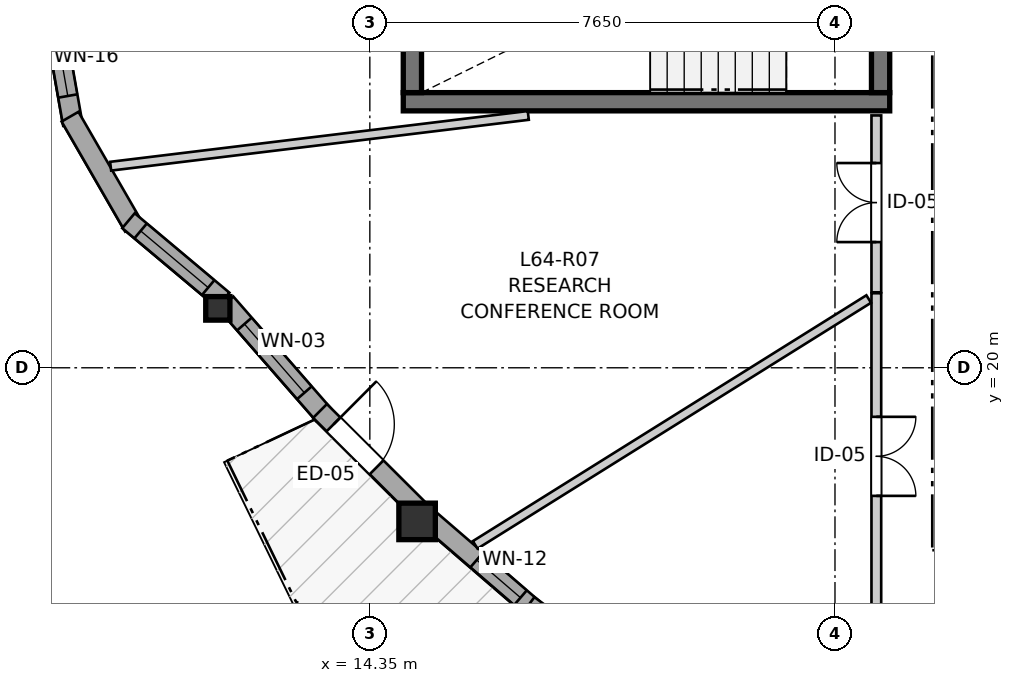
"""IFC4 building model, lengths in metres.
Left out: names, types, materials, properties, quantities, classifications, styles, units other than length and angle.
Written with IfcOpenShell. Run it as: python <this file> out.ifc"""

import sys

from ifc_helpers import new_model, si_unit, direction, frame, frame_2d, origin, origin_2d, place, context, subcontext, project, spatial, rectangle, i_section, extrude, source, transform, mapped, element, fill, save


model = new_model("IFC4")
c1 = context("Model", 3, precision=1e-05, world=origin(), true_north=direction((0.0, 1.0)))
c2 = subcontext(c1, "Body", "Model", "MODEL_VIEW")
j1 = project(units=[si_unit("LENGTHUNIT", "METRE"), si_unit("PLANEANGLEUNIT", "RADIAN")], contexts=[c1])
p1 = place(None, origin())
s1 = spatial("IfcSite", under=j1, at=p1, CompositionType="ELEMENT")
p2 = place(p1, origin())
s2 = spatial("IfcBuilding", under=s1, at=p2, CompositionType="ELEMENT")
p3 = place(p2, frame((0.0, 0.0, 214.8)))
s3 = spatial("IfcBuildingStorey", under=s2, at=p3, CompositionType="ELEMENT", Elevation=214.8)
p4 = place(p3, frame((14.9, 24.375, 0.0), z_axis=(0.0, 0.0, 1.0), x_axis=(1.0, 0.0, 0.0)))
e1 = element("IfcWall", 1, at=p4, inside=s3, PredefinedType="SHEAR", context=c2, shape_type="SweptSolid", body=[
    extrude(rectangle(XDim=8.0, YDim=0.3, at=frame_2d((4.0, 0.0))), origin(), (0.0, 0.0, 1.0), 2.96),
])
p5 = place(p3, frame((15.05, 27.475, 0.0), z_axis=(0.0, 0.0, 1.0), x_axis=(0.0, -1.0, 0.0)))
e2 = element("IfcWall", 2, at=p5, inside=s3, PredefinedType="SHEAR", context=c2, shape_type="SweptSolid", body=[
    extrude(rectangle(XDim=2.95, YDim=0.3, at=frame_2d((1.475, 0.0))), origin(), (0.0, 0.0, 1.0), 2.96),
])
p6 = place(p3, frame((22.75, 24.525, 0.0), z_axis=(0.0, 0.0, 1.0), x_axis=(0.0, 1.0, 0.0)))
e3 = element("IfcWall", 3, at=p6, inside=s3, PredefinedType="SHEAR", context=c2, shape_type="SweptSolid", body=[
    extrude(rectangle(XDim=2.95, YDim=0.3, at=frame_2d((1.475, 0.0))), origin(), (0.0, 0.0, 1.0), 2.96),
])
p7 = place(p6, frame((0.985, 0.0, 0.0)))
e4 = element("IfcOpeningElement", 4, at=p7, cuts=e3, PredefinedType="OPENING", context=c2, shape_type="SweptSolid", body=[
    extrude(rectangle(XDim=0.98, YDim=2.15, at=frame_2d((0.49, 1.075))), frame((0.0, 0.16, 0.0), z_axis=(0.0, -1.0, 0.0), x_axis=(1.0, 0.0, 0.0)), (0.0, 0.0, 1.0), 0.32),
])
m1 = source(origin(), c2, "Body", "SweptSolid", [
    extrude(i_section(OverallWidth=0.398, OverallDepth=0.387, WebThickness=0.019, FlangeThickness=0.03, FilletRadius=0.015, at=origin_2d()), origin(), (0.0, 0.0, 1.0), 2.96),
])
p8 = place(p3, frame((11.85, 20.977, 0.0), z_axis=(0.0, 0.0, 1.0), x_axis=(1.0, 0.0, 0.0)))
e5 = element("IfcColumn", 5, at=p8, inside=s3, PredefinedType="PILASTER", context=c2, shape_type="MappedRepresentation", body=[
    mapped(m1, transform((0.0, 0.0, 0.0), x_axis=(1.0, 0.0, 0.0), y_axis=(0.0, 1.0, 0.0), z_axis=(0.0, 0.0, 1.0), scale=1.0)),
])
m2 = source(origin(), c2, "Body", "SweptSolid", [
    extrude(rectangle(XDim=0.6, YDim=0.6, at=origin_2d()), origin(), (0.0, 0.0, 1.0), 2.96),
])
p9 = place(p3, frame((15.127, 17.474, 0.0), z_axis=(0.0, 0.0, 1.0), x_axis=(1.0, 0.0, 0.0)))
e6 = element("IfcColumn", 6, at=p9, inside=s3, PredefinedType="COLUMN", context=c2, shape_type="MappedRepresentation", body=[
    mapped(m2, transform((0.0, 0.0, 0.0), x_axis=(1.0, 0.0, 0.0), y_axis=(0.0, 1.0, 0.0), z_axis=(0.0, 0.0, 1.0), scale=1.0)),
])
p10 = place(p3, frame((9.101, 26.065, 0.0), z_axis=(0.0, 0.0, 1.0), x_axis=(0.173672066494, -0.984803540469, 0.0)))
e7 = element("IfcWall", 7, at=p10, inside=s3, PredefinedType="SOLIDWALL", context=c2, shape_type="SweptSolid", body=[
    extrude(rectangle(XDim=2.09, YDim=0.32, at=frame_2d((1.045, 0.0))), origin(), (0.0, 0.0, 1.0), 2.58),
])
p11 = place(p10, frame((0.47, 0.0, 0.82)))
e8 = element("IfcOpeningElement", 8, at=p11, cuts=e7, PredefinedType="OPENING", context=c2, shape_type="SweptSolid", body=[
    extrude(rectangle(XDim=1.15, YDim=1.2, at=frame_2d((0.575, 0.6))), frame((0.0, 0.17, 0.0), z_axis=(0.0, -1.0, 0.0), x_axis=(1.0, 0.0, 0.0)), (0.0, 0.0, 1.0), 0.34),
])
p12 = place(p3, frame((9.419, 24.129, 0.0), z_axis=(0.0, 0.0, 1.0), x_axis=(0.499995423472, -0.866028046028, 0.0)))
e9 = element("IfcWall", 9, at=p12, inside=s3, PredefinedType="SOLIDWALL", context=c2, shape_type="SweptSolid", body=[
    extrude(rectangle(XDim=2.09, YDim=0.32, at=frame_2d((1.045, 0.0))), origin(), (0.0, 0.0, 1.0), 2.58),
])
p13 = place(p3, frame((10.381, 22.419, 0.0), z_axis=(0.0, 0.0, 1.0), x_axis=(0.766099948115, -0.642721455608, 0.0)))
e10 = element("IfcWall", 10, at=p13, inside=s3, PredefinedType="SOLIDWALL", context=c2, shape_type="SweptSolid", body=[
    extrude(rectangle(XDim=2.032, YDim=0.32, at=frame_2d((1.016, 0.0))), origin(), (0.0, 0.0, 1.0), 2.58),
])
p14 = place(p13, frame((0.261, 0.0, 0.82)))
e11 = element("IfcOpeningElement", 11, at=p14, cuts=e10, PredefinedType="OPENING", context=c2, shape_type="SweptSolid", body=[
    extrude(rectangle(XDim=1.45, YDim=1.25, at=frame_2d((0.725, 0.625))), frame((0.0, 0.17, 0.0), z_axis=(0.0, -1.0, 0.0), x_axis=(1.0, 0.0, 0.0)), (0.0, 0.0, 1.0), 0.34),
])
p15 = place(p3, frame((11.984, 21.067, 0.0), z_axis=(0.0, 0.0, 1.0), x_axis=(0.657577552216, -0.753386861328, 0.0)))
e12 = element("IfcWall", 12, at=p15, inside=s3, PredefinedType="SOLIDWALL", context=c2, shape_type="SweptSolid", body=[
    extrude(rectangle(XDim=2.444, YDim=0.32, at=frame_2d((1.222, 0.0))), origin(), (0.0, 0.0, 1.0), 2.58),
])
p16 = place(p15, frame((0.462, 0.0, 0.82)))
e13 = element("IfcOpeningElement", 13, at=p16, cuts=e12, PredefinedType="OPENING", context=c2, shape_type="SweptSolid", body=[
    extrude(rectangle(XDim=1.5, YDim=1.45, at=frame_2d((0.75, 0.725))), frame((0.0, 0.17, 0.0), z_axis=(0.0, -1.0, 0.0), x_axis=(1.0, 0.0, 0.0)), (0.0, 0.0, 1.0), 0.34),
])
p17 = place(p3, frame((13.531, 19.29, 0.0), z_axis=(0.0, 0.0, 1.0), x_axis=(0.708419394795, -0.705791726417, 0.0)))
e14 = element("IfcWall", 14, at=p17, inside=s3, PredefinedType="SOLIDWALL", context=c2, shape_type="SweptSolid", body=[
    extrude(rectangle(XDim=2.323, YDim=0.32, at=frame_2d((1.161, 0.0))), origin(), (0.0, 0.0, 1.0), 2.58),
])
p18 = place(p17, frame((0.313, 0.0, 0.0)))
e15 = element("IfcOpeningElement", 15, at=p18, cuts=e14, PredefinedType="OPENING", context=c2, shape_type="SweptSolid", body=[
    extrude(rectangle(XDim=1.0, YDim=2.1, at=frame_2d((0.5, 1.05))), frame((0.0, 0.17, 0.0), z_axis=(0.0, -1.0, 0.0), x_axis=(1.0, 0.0, 0.0)), (0.0, 0.0, 1.0), 0.34),
])
p19 = place(p3, frame((15.3, 17.536, 0.0), z_axis=(0.0, 0.0, 1.0), x_axis=(0.757488333031, -0.652848700177, 0.0)))
e16 = element("IfcWall", 16, at=p19, inside=s3, PredefinedType="SOLIDWALL", context=c2, shape_type="SweptSolid", body=[
    extrude(rectangle(XDim=2.284, YDim=0.32, at=frame_2d((1.142, 0.0))), origin(), (0.0, 0.0, 1.0), 2.58),
])
p20 = place(p19, frame((1.067, 0.0, 0.82)))
e17 = element("IfcOpeningElement", 17, at=p20, cuts=e16, PredefinedType="OPENING", context=c2, shape_type="SweptSolid", body=[
    extrude(rectangle(XDim=0.95, YDim=1.35, at=frame_2d((0.475, 0.675))), frame((0.0, 0.17, 0.0), z_axis=(0.0, -1.0, 0.0), x_axis=(1.0, 0.0, 0.0)), (0.0, 0.0, 1.0), 0.34),
])
p21 = place(p3, frame((16.961, 16.1, 0.0), z_axis=(0.0, 0.0, 1.0), x_axis=(0.803809802043, -0.594886377504, 0.0)))
e18 = element("IfcWall", 18, at=p21, inside=s3, PredefinedType="SOLIDWALL", context=c2, shape_type="SweptSolid", body=[
    extrude(rectangle(XDim=2.328, YDim=0.32, at=frame_2d((1.164, 0.0))), origin(), (0.0, 0.0, 1.0), 2.58),
])
p22 = place(p21, frame((0.649, 0.0, 0.82)))
e19 = element("IfcOpeningElement", 19, at=p22, cuts=e18, PredefinedType="OPENING", context=c2, shape_type="SweptSolid", body=[
    extrude(rectangle(XDim=1.05, YDim=1.45, at=frame_2d((0.525, 0.725))), frame((0.0, 0.17, 0.0), z_axis=(0.0, -1.0, 0.0), x_axis=(1.0, 0.0, 0.0)), (0.0, 0.0, 1.0), 0.34),
])
p23 = place(p3, frame((22.68, 21.226, 0.0), z_axis=(0.0, 0.0, 1.0), x_axis=(0.0, -1.0, 0.0)))
e20 = element("IfcWall", 20, at=p23, inside=s3, PredefinedType="PARTITIONING", context=c2, shape_type="SweptSolid", body=[
    extrude(rectangle(XDim=5.348, YDim=0.16, at=frame_2d((2.674, 0.0))), origin(), (0.0, 0.0, 1.0), 2.96),
])
p24 = place(p23, frame((2.032, 0.0, 0.0)))
e21 = element("IfcOpeningElement", 21, at=p24, cuts=e20, PredefinedType="OPENING", context=c2, shape_type="SweptSolid", body=[
    extrude(rectangle(XDim=1.3, YDim=2.1, at=frame_2d((0.65, 1.05))), frame((0.0, 0.09, 0.0), z_axis=(0.0, -1.0, 0.0), x_axis=(1.0, 0.0, 0.0)), (0.0, 0.0, 1.0), 0.18),
])
p25 = place(p3, frame((22.68, 21.241, 0.0), z_axis=(0.0, 0.0, 1.0), x_axis=(0.0, 1.0, 0.0)))
e22 = element("IfcWall", 22, at=p25, inside=s3, PredefinedType="PARTITIONING", context=c2, shape_type="SweptSolid", body=[
    extrude(rectangle(XDim=2.909, YDim=0.16, at=frame_2d((1.455, 0.0))), origin(), (0.0, 0.0, 1.0), 2.96),
])
p26 = place(p25, frame((0.826, 0.0, 0.0)))
e23 = element("IfcOpeningElement", 23, at=p26, cuts=e22, PredefinedType="OPENING", context=c2, shape_type="SweptSolid", body=[
    extrude(rectangle(XDim=1.3, YDim=2.1, at=frame_2d((0.65, 1.05))), frame((0.0, 0.09, 0.0), z_axis=(0.0, -1.0, 0.0), x_axis=(1.0, 0.0, 0.0)), (0.0, 0.0, 1.0), 0.18),
])
p27 = place(p3, frame((16.083, 17.088, 0.0), z_axis=(0.0, 0.0, 1.0), x_axis=(0.848100737451, 0.529835011239, 0.0)))
e24 = element("IfcWall", 24, at=p27, inside=s3, PredefinedType="PARTITIONING", context=c2, shape_type="SweptSolid", body=[
    extrude(rectangle(XDim=7.631, YDim=0.145, at=frame_2d((3.815, 0.0))), origin(), (0.0, 0.0, 1.0), 2.96),
])
p28 = place(p3, frame((10.087, 23.315, 0.0), z_axis=(0.0, 0.0, 1.0), x_axis=(0.992692853732, 0.120668546642, 0.0)))
e25 = element("IfcWall", 25, at=p28, inside=s3, PredefinedType="PARTITIONING", context=c2, shape_type="SweptSolid", body=[
    extrude(rectangle(XDim=6.919, YDim=0.145, at=frame_2d((3.46, 0.0))), origin(), (0.0, 0.0, 1.0), 2.96),
])
m3 = source(origin(), c2, "Body", "SweptSolid", [
    extrude(rectangle(XDim=1.15, YDim=1.2, at=frame_2d((0.575, 0.6))), frame((0.0, 0.03, 0.0), z_axis=(0.0, -1.0, 0.0), x_axis=(1.0, 0.0, 0.0)), (0.0, 0.0, 1.0), 0.06),
])
p29 = place(p11, origin())
e26 = element("IfcWindow", 26, at=p29, inside=s3, PartitioningType="SINGLE_PANEL", PredefinedType="WINDOW", context=c2, shape_type="MappedRepresentation", body=[
    mapped(m3, transform((0.0, 0.0, 0.0), x_axis=(1.0, 0.0, 0.0), y_axis=(0.0, 1.0, 0.0), z_axis=(0.0, 0.0, 1.0), scale=1.0)),
])
fill(e8, e26)
m4 = source(origin(), c2, "Body", "SweptSolid", [
    extrude(rectangle(XDim=1.45, YDim=1.25, at=frame_2d((0.725, 0.625))), frame((0.0, 0.03, 0.0), z_axis=(0.0, -1.0, 0.0), x_axis=(1.0, 0.0, 0.0)), (0.0, 0.0, 1.0), 0.06),
])
p30 = place(p14, origin())
e27 = element("IfcWindow", 27, at=p30, inside=s3, PartitioningType="SINGLE_PANEL", PredefinedType="WINDOW", context=c2, shape_type="MappedRepresentation", body=[
    mapped(m4, transform((0.0, 0.0, 0.0), x_axis=(1.0, 0.0, 0.0), y_axis=(0.0, 1.0, 0.0), z_axis=(0.0, 0.0, 1.0), scale=1.0)),
])
fill(e11, e27)
m5 = source(origin(), c2, "Body", "SweptSolid", [
    extrude(rectangle(XDim=1.5, YDim=1.45, at=frame_2d((0.75, 0.725))), frame((0.0, 0.03, 0.0), z_axis=(0.0, -1.0, 0.0), x_axis=(1.0, 0.0, 0.0)), (0.0, 0.0, 1.0), 0.06),
])
p31 = place(p16, origin())
e28 = element("IfcWindow", 28, at=p31, inside=s3, PartitioningType="SINGLE_PANEL", PredefinedType="WINDOW", context=c2, shape_type="MappedRepresentation", body=[
    mapped(m5, transform((0.0, 0.0, 0.0), x_axis=(1.0, 0.0, 0.0), y_axis=(0.0, 1.0, 0.0), z_axis=(0.0, 0.0, 1.0), scale=1.0)),
])
fill(e13, e28)
m6 = source(origin(), c2, "Body", "SweptSolid", [
    extrude(rectangle(XDim=0.95, YDim=1.35, at=frame_2d((0.475, 0.675))), frame((0.0, 0.03, 0.0), z_axis=(0.0, -1.0, 0.0), x_axis=(1.0, 0.0, 0.0)), (0.0, 0.0, 1.0), 0.06),
])
p32 = place(p20, origin())
e29 = element("IfcWindow", 29, at=p32, inside=s3, PartitioningType="SINGLE_PANEL", PredefinedType="WINDOW", context=c2, shape_type="MappedRepresentation", body=[
    mapped(m6, transform((0.0, 0.0, 0.0), x_axis=(1.0, 0.0, 0.0), y_axis=(0.0, 1.0, 0.0), z_axis=(0.0, 0.0, 1.0), scale=1.0)),
])
fill(e17, e29)
m7 = source(origin(), c2, "Body", "SweptSolid", [
    extrude(rectangle(XDim=1.0, YDim=2.1, at=frame_2d((0.5, 1.05))), frame((0.0, 0.025, 0.0), z_axis=(0.0, -1.0, 0.0), x_axis=(1.0, 0.0, 0.0)), (0.0, 0.0, 1.0), 0.05),
])
p33 = place(p18, origin())
e30 = element("IfcDoor", 30, at=p33, inside=s3, OperationType="SINGLE_SWING_LEFT", PredefinedType="DOOR", context=c2, shape_type="MappedRepresentation", body=[
    mapped(m7, transform((0.0, 0.0, 0.0), x_axis=(1.0, 0.0, 0.0), y_axis=(0.0, 1.0, 0.0), z_axis=(0.0, 0.0, 1.0), scale=1.0)),
])
fill(e15, e30)
m8 = source(origin(), c2, "Body", "SweptSolid", [
    extrude(rectangle(XDim=1.3, YDim=2.1, at=frame_2d((0.65, 1.05))), frame((0.0, 0.025, 0.0), z_axis=(0.0, -1.0, 0.0), x_axis=(1.0, 0.0, 0.0)), (0.0, 0.0, 1.0), 0.05),
])
p34 = place(p24, origin())
e31 = element("IfcDoor", 31, at=p34, inside=s3, OperationType="DOUBLE_DOOR_SINGLE_SWING", PredefinedType="DOOR", context=c2, shape_type="MappedRepresentation", body=[
    mapped(m8, transform((0.0, 0.0, 0.0), x_axis=(1.0, 0.0, 0.0), y_axis=(0.0, 1.0, 0.0), z_axis=(0.0, 0.0, 1.0), scale=1.0)),
])
fill(e21, e31)
p35 = place(p26, origin())
e32 = element("IfcDoor", 32, at=p35, inside=s3, OperationType="DOUBLE_DOOR_SINGLE_SWING", PredefinedType="DOOR", context=c2, shape_type="MappedRepresentation", body=[
    mapped(m8, transform((0.0, 0.0, 0.0), x_axis=(1.0, 0.0, 0.0), y_axis=(0.0, 1.0, 0.0), z_axis=(0.0, 0.0, 1.0), scale=1.0)),
])
fill(e23, e32)
save(model, sys.argv[1])
